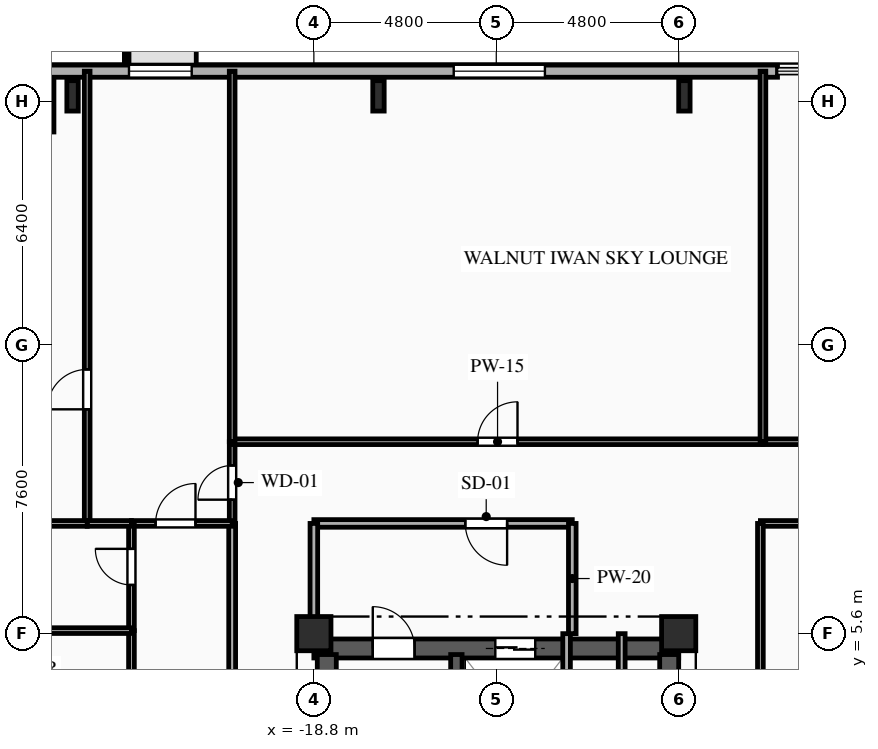
"""IFC4 building model, lengths in metres.
Left out: names, types, materials, properties, quantities, classifications, styles, units other than length and angle.
Written with IfcOpenShell. Run it as: python <this file> out.ifc"""

import sys

from ifc_helpers import new_model, si_unit, direction, frame, frame_2d, origin, origin_2d, place, context, subcontext, project, spatial, rectangle, i_section, extrude, element, fill, save


model = new_model("IFC4")
c1 = context("Model", 3, precision=1e-05, world=origin(), true_north=direction((0.0, 1.0)))
c2 = subcontext(c1, "Body", "Model", "MODEL_VIEW")
j1 = project(units=[si_unit("LENGTHUNIT", "METRE"), si_unit("PLANEANGLEUNIT", "RADIAN")], contexts=[c1])
p1 = place(None, origin())
s1 = spatial("IfcSite", under=j1, at=p1, CompositionType="ELEMENT")
p2 = place(p1, origin())
s2 = spatial("IfcBuilding", under=s1, at=p2, CompositionType="ELEMENT")
p3 = place(p2, frame((0.0, 0.0, 151.1)))
s3 = spatial("IfcBuildingStorey", under=s2, at=p3, CompositionType="ELEMENT", Elevation=151.1)
for number, where, z_axis, x_axis in (
    (1, (-18.8, 5.6, 0.0), (0.0, 0.0, 1.0), (1.0, 0.0, 0.0)),
    (2, (-9.2, 5.6, 0.0), (0.0, 0.0, 1.0), (1.0, 0.0, 0.0)),
):
    element("IfcColumn", number, at=place(p3, frame(where, z_axis=z_axis, x_axis=x_axis)), inside=s3, PredefinedType="COLUMN", context=c2, shape_type="SweptSolid", body=[
        extrude(rectangle(XDim=0.9, YDim=0.9, at=origin_2d()), origin(), (0.0, 0.0, 1.0), 3.35),
    ])
for number, where, z_axis, x_axis in (
    (3, (-9.05, 19.75, 0.0), (0.0, 0.0, 1.0), (1.0, 0.0, 0.0)),
    (4, (-17.1, 19.75, 0.0), (0.0, 0.0, 1.0), (1.0, 0.0, 0.0)),
    (5, (-25.15, 19.75, 0.0), (0.0, 0.0, 1.0), (1.0, 0.0, 0.0)),
):
    element("IfcColumn", number, at=place(p3, frame(where, z_axis=z_axis, x_axis=x_axis)), inside=s3, PredefinedType="COLUMN", context=c2, shape_type="SweptSolid", body=[
        extrude(i_section(OverallWidth=0.3, OverallDepth=0.8, WebThickness=0.018, FlangeThickness=0.033, FilletRadius=0.03, at=origin_2d()), origin(), (0.0, 0.0, 1.0), 3.35),
    ])
p4 = place(p3, frame((-25.8, 18.8, 0.0), z_axis=(0.0, 0.0, 1.0), x_axis=(0.0, 1.0, 0.0)))
e6 = element("IfcWall", 6, at=p4, inside=s3, PredefinedType="SOLIDWALL", context=c2, shape_type="SweptSolid", body=[
    extrude(rectangle(XDim=1.6, YDim=0.32, at=frame_2d((0.8, 0.0))), origin(), (0.0, 0.0, 1.0), 3.04),
])
p5 = place(p3, frame((-25.8, 20.4, 0.0), z_axis=(0.0, 0.0, 1.0), x_axis=(1.0, 0.0, 0.0)))
e7 = element("IfcWall", 7, at=p5, inside=s3, PredefinedType="SOLIDWALL", context=c2, shape_type="SweptSolid", body=[
    extrude(rectangle(XDim=19.2, YDim=0.32, at=frame_2d((9.6, 0.0))), origin(), (0.0, 0.0, 1.0), 3.04),
])
p6 = place(p5, frame((2.135, 0.0, 0.85)))
e8 = element("IfcOpeningElement", 8, at=p6, cuts=e7, PredefinedType="OPENING", context=c2, shape_type="SweptSolid", body=[
    extrude(rectangle(XDim=1.65, YDim=1.85, at=frame_2d((0.825, 0.925))), frame((0.0, 0.17, 0.0), z_axis=(0.0, -1.0, 0.0), x_axis=(1.0, 0.0, 0.0)), (0.0, 0.0, 1.0), 0.34),
])
p7 = place(p5, frame((10.68, 0.0, 0.85)))
e9 = element("IfcOpeningElement", 9, at=p7, cuts=e7, PredefinedType="OPENING", context=c2, shape_type="SweptSolid", body=[
    extrude(rectangle(XDim=2.4, YDim=1.95, at=frame_2d((1.2, 0.975))), frame((0.0, 0.17, 0.0), z_axis=(0.0, -1.0, 0.0), x_axis=(1.0, 0.0, 0.0)), (0.0, 0.0, 1.0), 0.34),
])
p8 = place(p3, frame((-18.8, 5.21, 0.0), z_axis=(0.0, 0.0, 1.0), x_axis=(1.0, 0.0, 0.0)))
e10 = element("IfcWall", 10, at=p8, inside=s3, PredefinedType="SHEAR", context=c2, shape_type="SweptSolid", body=[
    extrude(rectangle(XDim=9.6, YDim=0.5, at=frame_2d((4.8, 0.0))), origin(), (0.0, 0.0, 1.0), 3.04),
])
p9 = place(p8, frame((1.55, 0.0, 0.0)))
e11 = element("IfcOpeningElement", 11, at=p9, cuts=e10, PredefinedType="OPENING", context=c2, shape_type="SweptSolid", body=[
    extrude(rectangle(XDim=1.1, YDim=2.15, at=frame_2d((0.55, 1.075))), frame((0.0, 0.26, 0.0), z_axis=(0.0, -1.0, 0.0), x_axis=(1.0, 0.0, 0.0)), (0.0, 0.0, 1.0), 0.52),
])
p10 = place(p8, frame((4.775, 0.0, 0.0)))
e12 = element("IfcOpeningElement", 12, at=p10, cuts=e10, PredefinedType="OPENING", context=c2, shape_type="SweptSolid", body=[
    extrude(rectangle(XDim=1.05, YDim=2.1, at=frame_2d((0.525, 1.05))), frame((0.0, 0.26, 0.0), z_axis=(0.0, -1.0, 0.0), x_axis=(1.0, 0.0, 0.0)), (0.0, 0.0, 1.0), 0.52),
])
p11 = place(p3, frame((-18.46, -5.05, 0.0), z_axis=(0.0, 0.0, 1.0), x_axis=(0.0, 1.0, 0.0)))
e13 = element("IfcWall", 13, at=p11, inside=s3, PredefinedType="SHEAR", context=c2, shape_type="SweptSolid", body=[
    extrude(rectangle(XDim=10.1, YDim=0.5, at=frame_2d((5.05, 0.0))), origin(), (0.0, 0.0, 1.0), 3.04),
])
p12 = place(p3, frame((-9.45, -5.05, 0.0), z_axis=(0.0, 0.0, 1.0), x_axis=(0.0, 1.0, 0.0)))
e14 = element("IfcWall", 14, at=p12, inside=s3, PredefinedType="SHEAR", context=c2, shape_type="SweptSolid", body=[
    extrude(rectangle(XDim=10.1, YDim=0.5, at=frame_2d((5.05, 0.0))), origin(), (0.0, 0.0, 1.0), 3.04),
])
p13 = place(p12, frame((7.15, 0.0, 0.0)))
e15 = element("IfcOpeningElement", 15, at=p13, cuts=e14, PredefinedType="OPENING", context=c2, shape_type="SweptSolid", body=[
    extrude(rectangle(XDim=0.9, YDim=2.1, at=frame_2d((0.45, 1.05))), frame((0.0, 0.26, 0.0), z_axis=(0.0, -1.0, 0.0), x_axis=(1.0, 0.0, 0.0)), (0.0, 0.0, 1.0), 0.52),
])
p14 = place(p12, frame((2.4, 0.0, 0.0)))
e16 = element("IfcOpeningElement", 16, at=p14, cuts=e14, PredefinedType="OPENING", context=c2, shape_type="SweptSolid", body=[
    extrude(rectangle(XDim=1.2, YDim=2.15, at=frame_2d((0.6, 1.075))), frame((0.0, 0.26, 0.0), z_axis=(0.0, -1.0, 0.0), x_axis=(1.0, 0.0, 0.0)), (0.0, 0.0, 1.0), 0.52),
])
p15 = place(p12, frame((0.35, 0.0, 0.0)))
e17 = element("IfcOpeningElement", 17, at=p15, cuts=e14, PredefinedType="OPENING", context=c2, shape_type="SweptSolid", body=[
    extrude(rectangle(XDim=0.9, YDim=2.1, at=frame_2d((0.45, 1.05))), frame((0.0, 0.26, 0.0), z_axis=(0.0, -1.0, 0.0), x_axis=(1.0, 0.0, 0.0)), (0.0, 0.0, 1.0), 0.52),
])
p16 = place(p12, frame((5.0, 0.0, 0.0)))
e18 = element("IfcOpeningElement", 18, at=p16, cuts=e14, PredefinedType="OPENING", context=c2, shape_type="SweptSolid", body=[
    extrude(rectangle(XDim=0.9, YDim=2.1, at=frame_2d((0.45, 1.05))), frame((0.0, 0.26, 0.0), z_axis=(0.0, -1.0, 0.0), x_axis=(1.0, 0.0, 0.0)), (0.0, 0.0, 1.0), 0.52),
])
p17 = place(p3, frame((-15.05, -5.05, 0.0), z_axis=(0.0, 0.0, 1.0), x_axis=(0.0, 1.0, 0.0)))
e19 = element("IfcWall", 19, at=p17, inside=s3, PredefinedType="SHEAR", context=c2, shape_type="SweptSolid", body=[
    extrude(rectangle(XDim=10.1, YDim=0.3, at=frame_2d((5.05, 0.0))), origin(), (0.0, 0.0, 1.0), 3.04),
])
p18 = place(p3, frame((-12.15, 1.55, 0.0), z_axis=(0.0, 0.0, 1.0), x_axis=(0.0, 1.0, 0.0)))
e20 = element("IfcWall", 20, at=p18, inside=s3, PredefinedType="PARTITIONING", context=c2, shape_type="SweptSolid", body=[
    extrude(rectangle(XDim=4.05, YDim=0.2, at=frame_2d((2.025, 0.0))), origin(), (0.0, 0.0, 1.0), 3.04),
])
p19 = place(p3, frame((-12.0, 8.5, 0.0), z_axis=(0.0, 0.0, 1.0), x_axis=(-1.0, 0.0, 0.0)))
e21 = element("IfcWall", 21, at=p19, inside=s3, PredefinedType="PARTITIONING", context=c2, shape_type="SweptSolid", body=[
    extrude(rectangle(XDim=6.8, YDim=0.2, at=frame_2d((3.4, 0.0))), origin(), (0.0, 0.0, 1.0), 3.04),
])
p20 = place(p19, frame((1.715, 0.0, 0.0)))
e22 = element("IfcOpeningElement", 22, at=p20, cuts=e21, PredefinedType="OPENING", context=c2, shape_type="SweptSolid", body=[
    extrude(rectangle(XDim=1.1, YDim=2.15, at=frame_2d((0.55, 1.075))), frame((0.0, 0.11, 0.0), z_axis=(0.0, -1.0, 0.0), x_axis=(1.0, 0.0, 0.0)), (0.0, 0.0, 1.0), 0.22),
])
p21 = place(p3, frame((-18.8, 8.5, 0.0), z_axis=(0.0, 0.0, 1.0), x_axis=(0.0, -1.0, 0.0)))
e23 = element("IfcWall", 23, at=p21, inside=s3, PredefinedType="PARTITIONING", context=c2, shape_type="SweptSolid", body=[
    extrude(rectangle(XDim=2.9, YDim=0.2, at=frame_2d((1.45, 0.0))), origin(), (0.0, 0.0, 1.0), 2.525),
])
p22 = place(p3, frame((-12.0, 5.6, 0.0), z_axis=(0.0, 0.0, 1.0), x_axis=(0.0, 1.0, 0.0)))
e24 = element("IfcWall", 24, at=p22, inside=s3, PredefinedType="PARTITIONING", context=c2, shape_type="SweptSolid", body=[
    extrude(rectangle(XDim=2.9, YDim=0.2, at=frame_2d((1.45, 0.0))), origin(), (0.0, 0.0, 1.0), 3.04),
])
p23 = place(p3, frame((-10.7, 5.6, 0.0), z_axis=(0.0, 0.0, 1.0), x_axis=(0.0, -1.0, 0.0)))
e25 = element("IfcWall", 25, at=p23, inside=s3, PredefinedType="PARTITIONING", context=c2, shape_type="SweptSolid", body=[
    extrude(rectangle(XDim=4.05, YDim=0.18, at=frame_2d((2.025, 0.0))), origin(), (0.0, 0.0, 1.0), 3.04),
])
p24 = place(p23, frame((1.325, 0.0, 0.0)))
e26 = element("IfcOpeningElement", 26, at=p24, cuts=e25, PredefinedType="OPENING", context=c2, shape_type="SweptSolid", body=[
    extrude(rectangle(XDim=1.25, YDim=2.2, at=frame_2d((0.625, 1.1))), frame((0.0, 0.1, 0.0), z_axis=(0.0, -1.0, 0.0), x_axis=(1.0, 0.0, 0.0)), (0.0, 0.0, 1.0), 0.2),
])
p25 = place(p3, frame((-20.95, 8.5, 0.0), z_axis=(0.0, 0.0, 1.0), x_axis=(0.0, 1.0, 0.0)))
e27 = element("IfcWall", 27, at=p25, inside=s3, PredefinedType="PARTITIONING", context=c2, shape_type="SweptSolid", body=[
    extrude(rectangle(XDim=2.15, YDim=0.15, at=frame_2d((1.075, 0.0))), origin(), (0.0, 0.0, 1.0), 3.04),
])
p26 = place(p25, frame((0.625, 0.0, 0.0)))
e28 = element("IfcOpeningElement", 28, at=p26, cuts=e27, PredefinedType="OPENING", context=c2, shape_type="SweptSolid", body=[
    extrude(rectangle(XDim=0.9, YDim=2.1, at=frame_2d((0.45, 1.05))), frame((0.0, 0.085, 0.0), z_axis=(0.0, -1.0, 0.0), x_axis=(1.0, 0.0, 0.0)), (0.0, 0.0, 1.0), 0.17),
])
p27 = place(p3, frame((-20.95, 10.65, 0.0), z_axis=(0.0, 0.0, 1.0), x_axis=(1.0, 0.0, 0.0)))
e29 = element("IfcWall", 29, at=p27, inside=s3, PredefinedType="PARTITIONING", context=c2, shape_type="SweptSolid", body=[
    extrude(rectangle(XDim=13.967, YDim=0.15, at=frame_2d((6.983, 0.0))), origin(), (0.0, 0.0, 1.0), 3.04),
])
p28 = place(p27, frame((6.458, 0.0, 0.0)))
e30 = element("IfcOpeningElement", 30, at=p28, cuts=e29, PredefinedType="OPENING", context=c2, shape_type="SweptSolid", body=[
    extrude(rectangle(XDim=1.05, YDim=2.15, at=frame_2d((0.525, 1.075))), frame((0.0, 0.085, 0.0), z_axis=(0.0, -1.0, 0.0), x_axis=(1.0, 0.0, 0.0)), (0.0, 0.0, 1.0), 0.17),
])
p29 = place(p3, frame((-6.983, 10.65, 0.0), z_axis=(0.0, 0.0, 1.0), x_axis=(1.0, 0.0, 0.0)))
e31 = element("IfcWall", 31, at=p29, inside=s3, PredefinedType="PARTITIONING", context=c2, shape_type="SweptSolid", body=[
    extrude(rectangle(XDim=6.983, YDim=0.15, at=frame_2d((3.491, 0.0))), origin(), (0.0, 0.0, 1.0), 3.04),
])
p30 = place(p29, frame((4.756, 0.0, 0.0)))
e32 = element("IfcOpeningElement", 32, at=p30, cuts=e31, PredefinedType="OPENING", context=c2, shape_type="SweptSolid", body=[
    extrude(rectangle(XDim=1.05, YDim=2.15, at=frame_2d((0.525, 1.075))), frame((0.0, 0.085, 0.0), z_axis=(0.0, -1.0, 0.0), x_axis=(1.0, 0.0, 0.0)), (0.0, 0.0, 1.0), 0.17),
])
p31 = place(p3, frame((0.0, 8.5, 0.0), z_axis=(0.0, 0.0, 1.0), x_axis=(-1.0, 0.0, 0.0)))
e33 = element("IfcWall", 33, at=p31, inside=s3, PredefinedType="PARTITIONING", context=c2, shape_type="SweptSolid", body=[
    extrude(rectangle(XDim=7.05, YDim=0.15, at=frame_2d((3.525, 0.0))), origin(), (0.0, 0.0, 1.0), 3.04),
])
p32 = place(p3, frame((-20.95, -5.6, 0.0), z_axis=(0.0, 0.0, 1.0), x_axis=(0.0, 1.0, 0.0)))
e34 = element("IfcWall", 34, at=p32, inside=s3, PredefinedType="PARTITIONING", context=c2, shape_type="SweptSolid", body=[
    extrude(rectangle(XDim=14.1, YDim=0.18, at=frame_2d((7.05, 0.0))), origin(), (0.0, 0.0, 1.0), 3.04),
])
p33 = place(p32, frame((5.058, 0.0, 0.0)))
e35 = element("IfcOpeningElement", 35, at=p33, cuts=e34, PredefinedType="OPENING", context=c2, shape_type="SweptSolid", body=[
    extrude(rectangle(XDim=1.0, YDim=2.15, at=frame_2d((0.5, 1.075))), frame((0.0, 0.1, 0.0), z_axis=(0.0, -1.0, 0.0), x_axis=(1.0, 0.0, 0.0)), (0.0, 0.0, 1.0), 0.2),
])
p34 = place(p3, frame((-7.05, 8.5, 0.0), z_axis=(0.0, 0.0, 1.0), x_axis=(0.0, -1.0, 0.0)))
e36 = element("IfcWall", 36, at=p34, inside=s3, PredefinedType="PARTITIONING", context=c2, shape_type="SweptSolid", body=[
    extrude(rectangle(XDim=9.3, YDim=0.15, at=frame_2d((4.65, 0.0))), origin(), (0.0, 0.0, 1.0), 3.04),
])
p35 = place(p3, frame((-23.6, 8.5, 0.0), z_axis=(0.0, 0.0, 1.0), x_axis=(1.0, 0.0, 0.0)))
e37 = element("IfcWall", 37, at=p35, inside=s3, PredefinedType="PARTITIONING", context=c2, shape_type="SweptSolid", body=[
    extrude(rectangle(XDim=2.65, YDim=0.15, at=frame_2d((1.325, 0.0))), origin(), (0.0, 0.0, 1.0), 3.04),
])
p36 = place(p35, frame((0.635, 0.0, 0.0)))
e38 = element("IfcOpeningElement", 38, at=p36, cuts=e37, PredefinedType="OPENING", context=c2, shape_type="SweptSolid", body=[
    extrude(rectangle(XDim=1.05, YDim=2.15, at=frame_2d((0.525, 1.075))), frame((0.0, 0.085, 0.0), z_axis=(0.0, -1.0, 0.0), x_axis=(1.0, 0.0, 0.0)), (0.0, 0.0, 1.0), 0.17),
])
p37 = place(p3, frame((-23.6, 2.86, 0.0), z_axis=(0.0, 0.0, 1.0), x_axis=(0.0, 1.0, 0.0)))
e39 = element("IfcWall", 39, at=p37, inside=s3, PredefinedType="PARTITIONING", context=c2, shape_type="SweptSolid", body=[
    extrude(rectangle(XDim=2.82, YDim=0.15, at=frame_2d((1.41, 0.0))), origin(), (0.0, 0.0, 1.0), 2.695),
])
p38 = place(p37, frame((0.669, 0.0, 0.0)))
e40 = element("IfcOpeningElement", 40, at=p38, cuts=e39, PredefinedType="OPENING", context=c2, shape_type="SweptSolid", body=[
    extrude(rectangle(XDim=0.95, YDim=2.1, at=frame_2d((0.475, 1.05))), frame((0.0, 0.085, 0.0), z_axis=(0.0, -1.0, 0.0), x_axis=(1.0, 0.0, 0.0)), (0.0, 0.0, 1.0), 0.17),
])
p39 = place(p3, frame((-23.6, 5.68, 0.0), z_axis=(0.0, 0.0, 1.0), x_axis=(0.0, 1.0, 0.0)))
e41 = element("IfcWall", 41, at=p39, inside=s3, PredefinedType="PARTITIONING", context=c2, shape_type="SweptSolid", body=[
    extrude(rectangle(XDim=2.82, YDim=0.15, at=frame_2d((1.41, 0.0))), origin(), (0.0, 0.0, 1.0), 2.695),
])
p40 = place(p39, frame((1.201, 0.0, 0.0)))
e42 = element("IfcOpeningElement", 42, at=p40, cuts=e41, PredefinedType="OPENING", context=c2, shape_type="SweptSolid", body=[
    extrude(rectangle(XDim=0.95, YDim=2.1, at=frame_2d((0.475, 1.05))), frame((0.0, 0.085, 0.0), z_axis=(0.0, -1.0, 0.0), x_axis=(1.0, 0.0, 0.0)), (0.0, 0.0, 1.0), 0.17),
])
p41 = place(p3, frame((-24.765, 8.5, 0.0), z_axis=(0.0, 0.0, 1.0), x_axis=(0.0, 1.0, 0.0)))
e43 = element("IfcWall", 43, at=p41, inside=s3, PredefinedType="PARTITIONING", context=c2, shape_type="SweptSolid", body=[
    extrude(rectangle(XDim=11.9, YDim=0.15, at=frame_2d((5.95, 0.0))), origin(), (0.0, 0.0, 1.0), 3.04),
])
p42 = place(p41, frame((3.002, 0.0, 0.0)))
e44 = element("IfcOpeningElement", 44, at=p42, cuts=e43, PredefinedType="OPENING", context=c2, shape_type="SweptSolid", body=[
    extrude(rectangle(XDim=1.05, YDim=2.15, at=frame_2d((0.525, 1.075))), frame((0.0, 0.085, 0.0), z_axis=(0.0, -1.0, 0.0), x_axis=(1.0, 0.0, 0.0)), (0.0, 0.0, 1.0), 0.17),
])
p43 = place(p3, frame((-23.6, 8.5, 0.0), z_axis=(0.0, 0.0, 1.0), x_axis=(-1.0, 0.0, 0.0)))
e45 = element("IfcWall", 45, at=p43, inside=s3, PredefinedType="PARTITIONING", context=c2, shape_type="SweptSolid", body=[
    extrude(rectangle(XDim=1.165, YDim=0.15, at=frame_2d((0.583, 0.0))), origin(), (0.0, 0.0, 1.0), 3.04),
])
p44 = place(p3, frame((-20.95, 20.4, 0.0), z_axis=(0.0, 0.0, 1.0), x_axis=(0.0, -1.0, 0.0)))
e46 = element("IfcWall", 46, at=p44, inside=s3, PredefinedType="PARTITIONING", context=c2, shape_type="SweptSolid", body=[
    extrude(rectangle(XDim=9.75, YDim=0.15, at=frame_2d((4.875, 0.0))), origin(), (0.0, 0.0, 1.0), 3.04),
])
p45 = place(p3, frame((-24.765, 8.5, 0.0), z_axis=(0.0, 0.0, 1.0), x_axis=(-1.0, 0.0, 0.0)))
e47 = element("IfcWall", 47, at=p45, inside=s3, PredefinedType="PARTITIONING", context=c2, shape_type="SweptSolid", body=[
    extrude(rectangle(XDim=4.235, YDim=0.15, at=frame_2d((2.118, 0.0))), origin(), (0.0, 0.0, 1.0), 3.04),
])
p46 = place(p3, frame((-29.0, 5.68, 0.0), z_axis=(0.0, 0.0, 1.0), x_axis=(1.0, 0.0, 0.0)))
e48 = element("IfcWall", 48, at=p46, inside=s3, PredefinedType="PARTITIONING", context=c2, shape_type="SweptSolid", body=[
    extrude(rectangle(XDim=5.4, YDim=0.15, at=frame_2d((2.7, 0.0))), origin(), (0.0, 0.0, 1.0), 3.04),
])
p47 = place(p3, frame((-6.983, 20.4, 0.0), z_axis=(0.0, 0.0, 1.0), x_axis=(0.0, -1.0, 0.0)))
e49 = element("IfcWall", 49, at=p47, inside=s3, PredefinedType="PARTITIONING", context=c2, shape_type="SweptSolid", body=[
    extrude(rectangle(XDim=9.75, YDim=0.15, at=frame_2d((4.875, 0.0))), origin(), (0.0, 0.0, 1.0), 3.04),
])
p48 = place(p6, origin())
e50 = element("IfcWindow", 50, at=p48, inside=s3, PartitioningType="SINGLE_PANEL", PredefinedType="WINDOW", context=c2, shape_type="SweptSolid", body=[
    extrude(rectangle(XDim=1.65, YDim=1.85, at=frame_2d((0.825, 0.925))), frame((0.0, 0.03, 0.0), z_axis=(0.0, -1.0, 0.0), x_axis=(1.0, 0.0, 0.0)), (0.0, 0.0, 1.0), 0.06),
])
fill(e8, e50)
p49 = place(p7, origin())
e51 = element("IfcWindow", 51, at=p49, inside=s3, PartitioningType="SINGLE_PANEL", PredefinedType="WINDOW", context=c2, shape_type="SweptSolid", body=[
    extrude(rectangle(XDim=2.4, YDim=1.95, at=frame_2d((1.2, 0.975))), frame((0.0, 0.03, 0.0), z_axis=(0.0, -1.0, 0.0), x_axis=(1.0, 0.0, 0.0)), (0.0, 0.0, 1.0), 0.06),
])
fill(e9, e51)
p50 = place(p9, origin())
e52 = element("IfcDoor", 52, at=p50, inside=s3, OperationType="SINGLE_SWING_LEFT", PredefinedType="DOOR", context=c2, shape_type="SweptSolid", body=[
    extrude(rectangle(XDim=1.1, YDim=2.15, at=frame_2d((0.55, 1.075))), frame((0.0, 0.025, 0.0), z_axis=(0.0, -1.0, 0.0), x_axis=(1.0, 0.0, 0.0)), (0.0, 0.0, 1.0), 0.05),
])
fill(e11, e52)
p51 = place(p10, origin())
e53 = element("IfcDoor", 53, at=p51, inside=s3, OperationType="DOUBLE_DOOR_SLIDING", PredefinedType="DOOR", context=c2, shape_type="SweptSolid", body=[
    extrude(rectangle(XDim=1.05, YDim=2.1, at=frame_2d((0.525, 1.05))), frame((0.0, 0.025, 0.0), z_axis=(0.0, -1.0, 0.0), x_axis=(1.0, 0.0, 0.0)), (0.0, 0.0, 1.0), 0.05),
])
fill(e12, e53)
p52 = place(p20, origin())
e54 = element("IfcDoor", 54, at=p52, inside=s3, OperationType="SINGLE_SWING_LEFT", PredefinedType="DOOR", context=c2, shape_type="SweptSolid", body=[
    extrude(rectangle(XDim=1.1, YDim=2.15, at=frame_2d((0.55, 1.075))), frame((0.0, 0.025, 0.0), z_axis=(0.0, -1.0, 0.0), x_axis=(1.0, 0.0, 0.0)), (0.0, 0.0, 1.0), 0.05),
])
fill(e22, e54)
p53 = place(p26, origin())
e55 = element("IfcDoor", 55, at=p53, inside=s3, OperationType="SINGLE_SWING_LEFT", PredefinedType="DOOR", context=c2, shape_type="SweptSolid", body=[
    extrude(rectangle(XDim=0.9, YDim=2.1, at=frame_2d((0.45, 1.05))), frame((0.0, 0.025, 0.0), z_axis=(0.0, -1.0, 0.0), x_axis=(1.0, 0.0, 0.0)), (0.0, 0.0, 1.0), 0.05),
])
fill(e28, e55)
p54 = place(p28, origin())
e56 = element("IfcDoor", 56, at=p54, inside=s3, OperationType="SINGLE_SWING_RIGHT", PredefinedType="DOOR", context=c2, shape_type="SweptSolid", body=[
    extrude(rectangle(XDim=1.05, YDim=2.15, at=frame_2d((0.525, 1.075))), frame((0.0, 0.025, 0.0), z_axis=(0.0, -1.0, 0.0), x_axis=(1.0, 0.0, 0.0)), (0.0, 0.0, 1.0), 0.05),
])
fill(e30, e56)
p55 = place(p36, origin())
e57 = element("IfcDoor", 57, at=p55, inside=s3, OperationType="SINGLE_SWING_RIGHT", PredefinedType="DOOR", context=c2, shape_type="SweptSolid", body=[
    extrude(rectangle(XDim=1.05, YDim=2.15, at=frame_2d((0.525, 1.075))), frame((0.0, 0.025, 0.0), z_axis=(0.0, -1.0, 0.0), x_axis=(1.0, 0.0, 0.0)), (0.0, 0.0, 1.0), 0.05),
])
fill(e38, e57)
p56 = place(p40, origin())
e58 = element("IfcDoor", 58, at=p56, inside=s3, OperationType="SINGLE_SWING_RIGHT", PredefinedType="DOOR", context=c2, shape_type="SweptSolid", body=[
    extrude(rectangle(XDim=0.95, YDim=2.1, at=frame_2d((0.475, 1.05))), frame((0.0, 0.025, 0.0), z_axis=(0.0, -1.0, 0.0), x_axis=(1.0, 0.0, 0.0)), (0.0, 0.0, 1.0), 0.05),
])
fill(e42, e58)
p57 = place(p42, origin())
e59 = element("IfcDoor", 59, at=p57, inside=s3, OperationType="SINGLE_SWING_LEFT", PredefinedType="DOOR", context=c2, shape_type="SweptSolid", body=[
    extrude(rectangle(XDim=1.05, YDim=2.15, at=frame_2d((0.525, 1.075))), frame((0.0, 0.025, 0.0), z_axis=(0.0, -1.0, 0.0), x_axis=(1.0, 0.0, 0.0)), (0.0, 0.0, 1.0), 0.05),
])
fill(e44, e59)
save(model, sys.argv[1])
